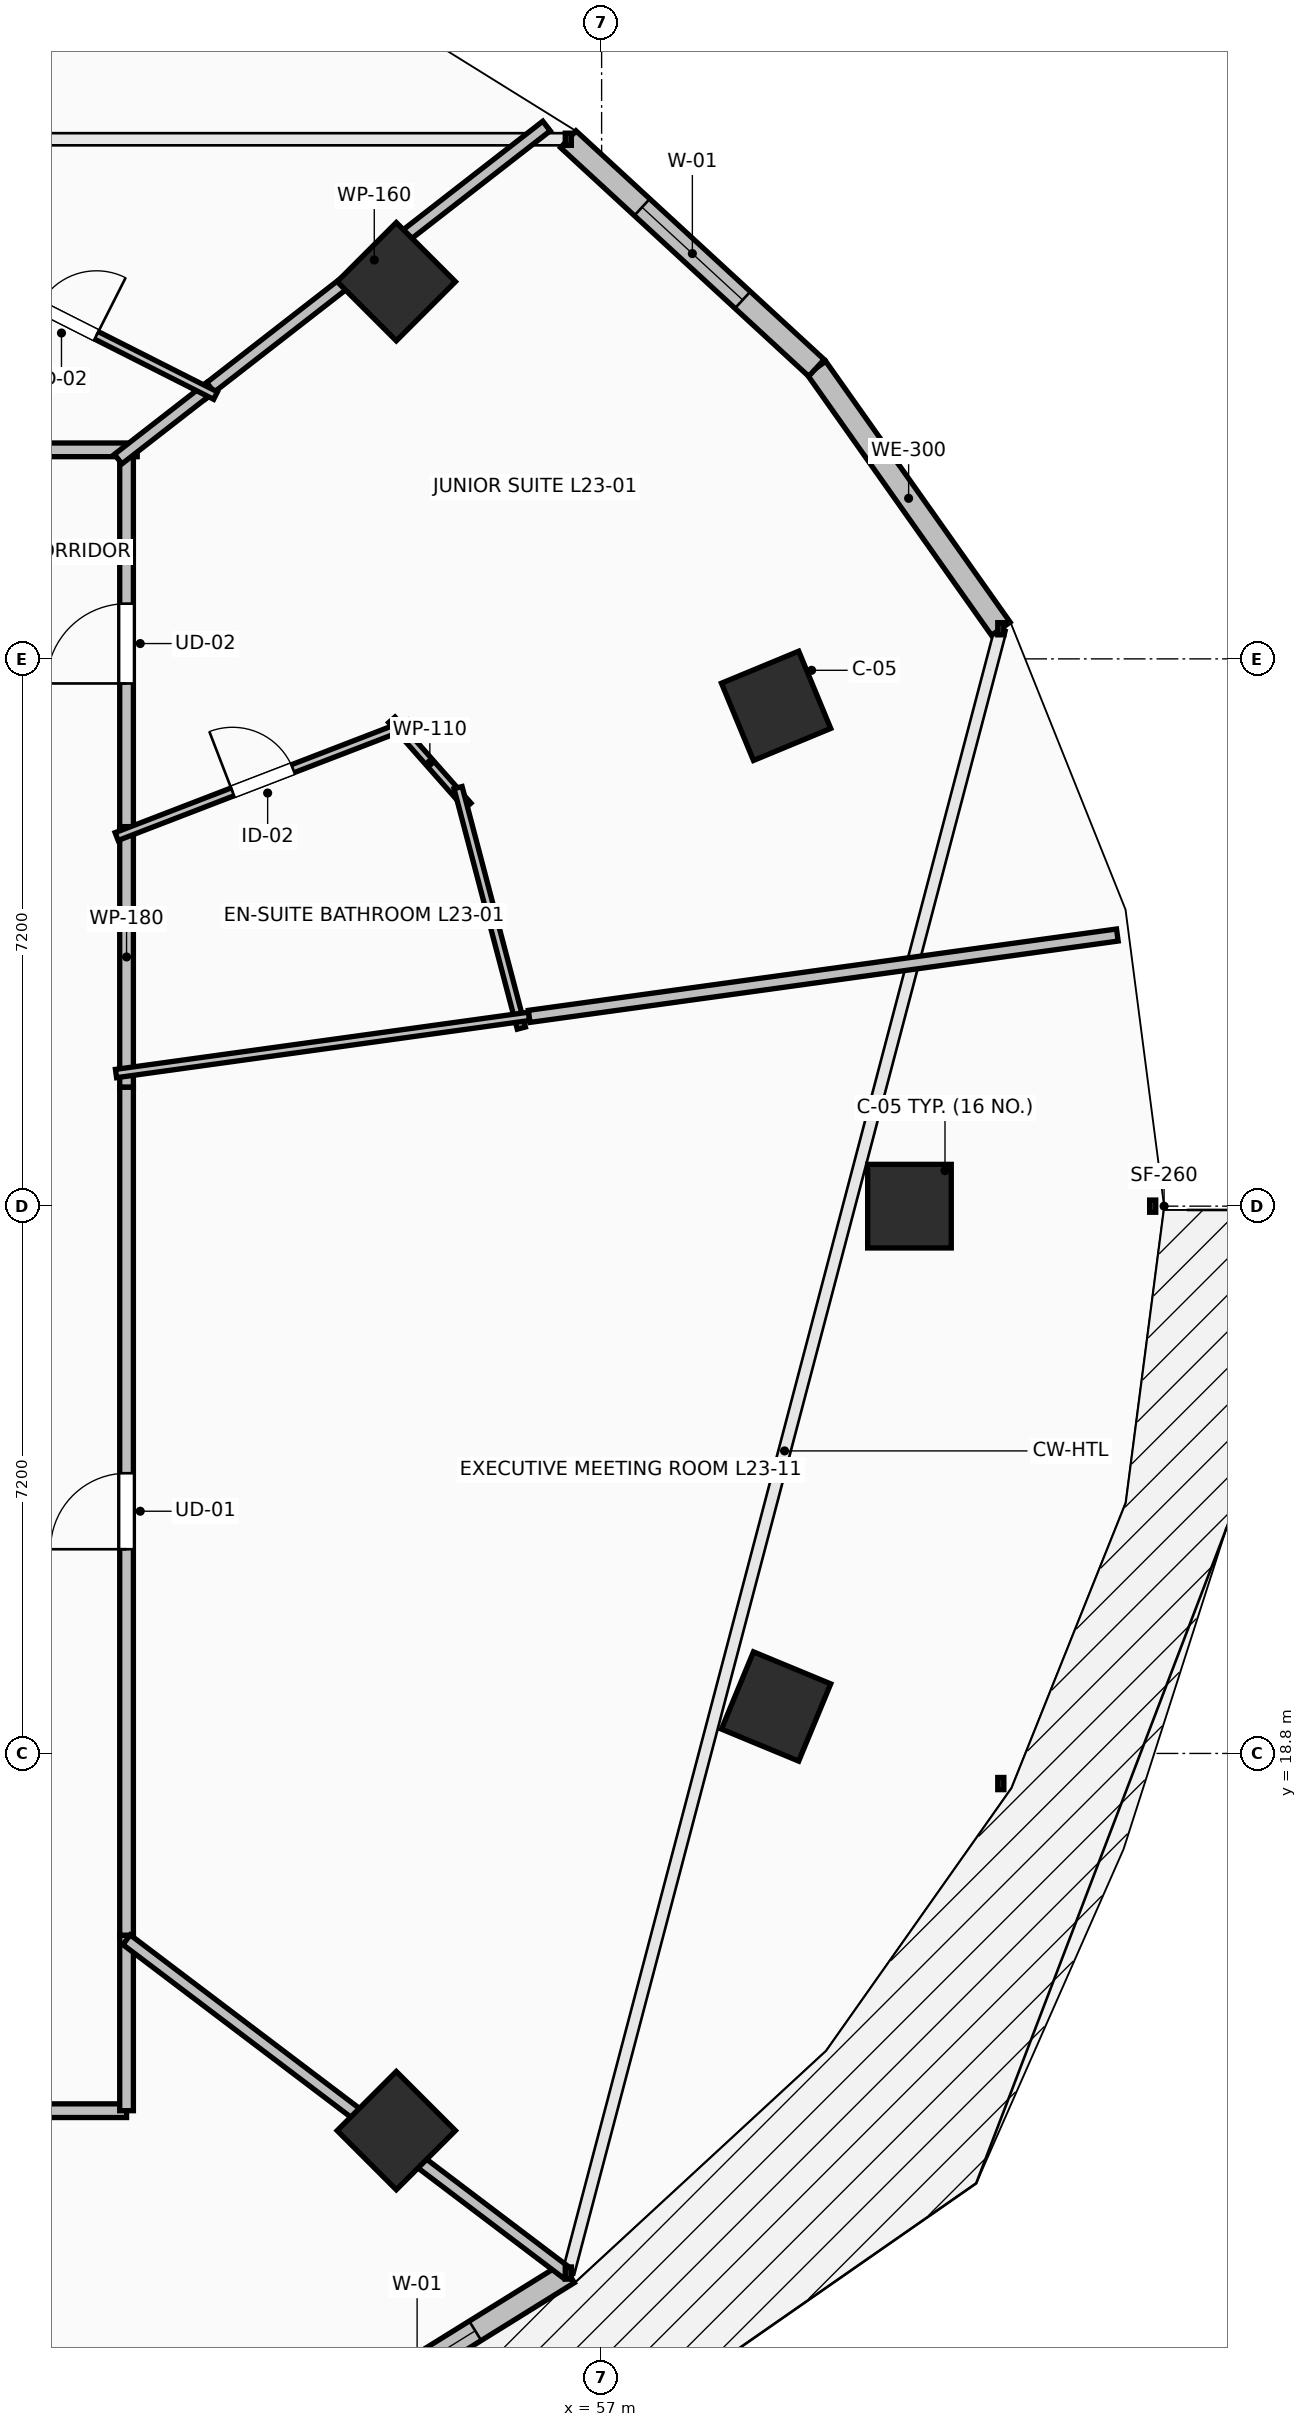
"""IFC4 building model, lengths in metres.
Left out: names, types, materials, properties, quantities, classifications, styles, units other than length and angle.
Written with IfcOpenShell. Run it as: python <this file> out.ifc"""

import sys

from ifc_helpers import new_model, si_unit, direction, frame, frame_2d, origin, origin_2d, place, context, subcontext, project, spatial, rectangle, extrude, element, fill, save


model = new_model("IFC4")
c1 = context("Model", 3, precision=1e-05, world=origin(), true_north=direction((0.0, 1.0)))
c2 = subcontext(c1, "Body", "Model", "MODEL_VIEW")
j1 = project(units=[si_unit("LENGTHUNIT", "METRE"), si_unit("PLANEANGLEUNIT", "RADIAN")], contexts=[c1])
p1 = place(None, origin())
s1 = spatial("IfcSite", under=j1, at=p1, CompositionType="ELEMENT")
p2 = place(p1, origin())
s2 = spatial("IfcBuilding", under=s1, at=p2, CompositionType="ELEMENT")
p3 = place(p2, frame((0.0, 0.0, 89.3)))
s3 = spatial("IfcBuildingStorey", under=s2, at=p3, CompositionType="ELEMENT", Elevation=89.3)
for number, where, z_axis, x_axis in (
    (1, (61.05, 26.0, 0.0), (0.0, 0.0, 1.0), (1.0, 0.0, 0.0)),
    (2, (59.295, 32.582, 0.0), (0.0, 0.0, 1.0), (0.924, 0.383, 0.0)),
    (3, (54.299, 38.162, 0.0), (0.0, 0.0, 1.0), (0.707, 0.707, 0.0)),
    (4, (54.299, 13.838, 0.0), (0.0, 0.0, 1.0), (0.707, -0.707, 0.0)),
    (5, (59.295, 19.418, 0.0), (0.0, 0.0, 1.0), (0.924, -0.383, 0.0)),
):
    element("IfcColumn", number, at=place(p3, frame(where, z_axis=z_axis, x_axis=x_axis)), inside=s3, PredefinedType="COLUMN", context=c2, shape_type="SweptSolid", body=[
        extrude(rectangle(XDim=1.1, YDim=1.1, at=origin_2d()), origin(), (0.0, 0.0, 1.0), 3.5),
    ])
p4 = place(p3, frame((62.252, 33.596, 0.0), z_axis=(0.0, 0.0, 1.0), x_axis=(-0.57716435238, 0.81662801222, 0.0)))
e6 = element("IfcWall", 6, at=p4, inside=s3, PredefinedType="STANDARD", context=c2, shape_type="SweptSolid", body=[
    extrude(rectangle(XDim=4.202, YDim=0.3, at=frame_2d((2.101, 0.0))), origin(), (0.0, 0.0, 1.0), 3.24),
])
p5 = place(p3, frame((59.826, 37.028, 0.0), z_axis=(0.0, 0.0, 1.0), x_axis=(-0.735416718093, 0.677615119924, 0.0)))
e7 = element("IfcWall", 7, at=p5, inside=s3, PredefinedType="STANDARD", context=c2, shape_type="SweptSolid", body=[
    extrude(rectangle(XDim=4.439, YDim=0.3, at=frame_2d((2.22, 0.0))), origin(), (0.0, 0.0, 1.0), 3.24),
])
p6 = place(p5, frame((1.32, 0.0, 0.85)))
e8 = element("IfcOpeningElement", 8, at=p6, cuts=e7, PredefinedType="OPENING", context=c2, shape_type="SweptSolid", body=[
    extrude(rectangle(XDim=1.8, YDim=2.19, at=frame_2d((0.9, 1.095))), frame((0.0, 0.165, 0.0), z_axis=(0.0, -1.0, 0.0), x_axis=(1.0, 0.0, 0.0)), (0.0, 0.0, 1.0), 0.33),
])
p7 = place(p3, frame((52.584, 9.495, 0.0), z_axis=(0.0, 0.0, 1.0), x_axis=(0.849684479743, 0.527291461038, 0.0)))
e9 = element("IfcWall", 9, at=p7, inside=s3, PredefinedType="STANDARD", context=c2, shape_type="SweptSolid", body=[
    extrude(rectangle(XDim=4.681, YDim=0.3, at=frame_2d((2.341, 0.0))), origin(), (0.0, 0.0, 1.0), 3.24),
])
p8 = place(p7, frame((1.441, 0.0, 0.85)))
e10 = element("IfcOpeningElement", 10, at=p8, cuts=e9, PredefinedType="OPENING", context=c2, shape_type="SweptSolid", body=[
    extrude(rectangle(XDim=1.8, YDim=2.19, at=frame_2d((0.9, 1.095))), frame((0.0, 0.165, 0.0), z_axis=(0.0, -1.0, 0.0), x_axis=(1.0, 0.0, 0.0)), (0.0, 0.0, 1.0), 0.33),
])
p9 = place(p3, frame((50.75, 30.853, 0.0), z_axis=(0.0, 0.0, 1.0), x_axis=(0.0, 1.0, 0.0)))
e11 = element("IfcWall", 11, at=p9, inside=s3, PredefinedType="PARTITIONING", context=c2, shape_type="SweptSolid", body=[
    extrude(rectangle(XDim=5.097, YDim=0.18, at=frame_2d((2.548, 0.0))), origin(), (0.0, 0.0, 1.0), 2.432),
])
p10 = place(p9, frame((2.023, 0.0, 0.0)))
e12 = element("IfcOpeningElement", 12, at=p10, cuts=e11, PredefinedType="OPENING", context=c2, shape_type="SweptSolid", body=[
    extrude(rectangle(XDim=1.05, YDim=2.2, at=frame_2d((0.525, 1.1))), frame((0.0, 0.105, 0.0), z_axis=(0.0, -1.0, 0.0), x_axis=(1.0, 0.0, 0.0)), (0.0, 0.0, 1.0), 0.21),
])
p11 = place(p3, frame((50.75, 27.564, 0.0), z_axis=(0.0, 0.0, 1.0), x_axis=(0.0, 1.0, 0.0)))
e13 = element("IfcWall", 13, at=p11, inside=s3, PredefinedType="PARTITIONING", context=c2, shape_type="SweptSolid", body=[
    extrude(rectangle(XDim=3.429, YDim=0.18, at=frame_2d((1.714, 0.0))), origin(), (0.0, 0.0, 1.0), 2.432),
])
p12 = place(p3, frame((50.89, 35.95, 0.0), z_axis=(0.0, 0.0, 1.0), x_axis=(-1.0, 0.0, 0.0)))
e14 = element("IfcWall", 14, at=p12, inside=s3, PredefinedType="PARTITIONING", context=c2, shape_type="SweptSolid", body=[
    extrude(rectangle(XDim=4.914, YDim=0.18, at=frame_2d((2.457, 0.0))), origin(), (0.0, 0.0, 1.0), 2.432),
])
p13 = place(p3, frame((44.181, 14.1, 0.0), z_axis=(0.0, 0.0, 1.0), x_axis=(1.0, 0.0, 0.0)))
e15 = element("IfcWall", 15, at=p13, inside=s3, PredefinedType="PARTITIONING", context=c2, shape_type="SweptSolid", body=[
    extrude(rectangle(XDim=6.569, YDim=0.18, at=frame_2d((3.285, 0.0))), origin(), (0.0, 0.0, 1.0), 2.432),
])
p14 = place(p13, frame((2.76, 0.0, 0.0)))
e16 = element("IfcOpeningElement", 16, at=p14, cuts=e15, PredefinedType="OPENING", context=c2, shape_type="SweptSolid", body=[
    extrude(rectangle(XDim=1.05, YDim=2.2, at=frame_2d((0.525, 1.1))), frame((0.0, 0.105, 0.0), z_axis=(0.0, -1.0, 0.0), x_axis=(1.0, 0.0, 0.0)), (0.0, 0.0, 1.0), 0.21),
])
p15 = place(p3, frame((50.75, 14.1, 0.0), z_axis=(0.0, 0.0, 1.0), x_axis=(0.0, 1.0, 0.0)))
e17 = element("IfcWall", 17, at=p15, inside=s3, PredefinedType="PARTITIONING", context=c2, shape_type="SweptSolid", body=[
    extrude(rectangle(XDim=2.309, YDim=0.18, at=frame_2d((1.154, 0.0))), origin(), (0.0, 0.0, 1.0), 2.432),
])
p16 = place(p3, frame((50.75, 16.409, 0.0), z_axis=(0.0, 0.0, 1.0), x_axis=(0.0, 1.0, 0.0)))
e18 = element("IfcWall", 18, at=p16, inside=s3, PredefinedType="PARTITIONING", context=c2, shape_type="SweptSolid", body=[
    extrude(rectangle(XDim=11.155, YDim=0.18, at=frame_2d((5.578, 0.0))), origin(), (0.0, 0.0, 1.0), 2.432),
])
p17 = place(p16, frame((5.077, 0.0, 0.0)))
e19 = element("IfcOpeningElement", 19, at=p17, cuts=e18, PredefinedType="OPENING", context=c2, shape_type="SweptSolid", body=[
    extrude(rectangle(XDim=1.0, YDim=2.15, at=frame_2d((0.5, 1.075))), frame((0.0, 0.105, 0.0), z_axis=(0.0, -1.0, 0.0), x_axis=(1.0, 0.0, 0.0)), (0.0, 0.0, 1.0), 0.21),
])
p18 = place(p3, frame((54.24, 32.398, 0.0), z_axis=(0.0, 0.0, 1.0), x_axis=(0.661931735756, -0.749564124808, 0.0)))
e20 = element("IfcWall", 20, at=p18, inside=s3, PredefinedType="PARTITIONING", context=c2, shape_type="SweptSolid", body=[
    extrude(rectangle(XDim=1.51, YDim=0.11, at=frame_2d((0.755, 0.0))), origin(), (0.0, 0.0, 1.0), 3.24),
])
p19 = place(p3, frame((55.111, 31.506, 0.0), z_axis=(0.0, 0.0, 1.0), x_axis=(0.254405137241, -0.967097733502, 0.0)))
e21 = element("IfcWall", 21, at=p19, inside=s3, PredefinedType="PARTITIONING", context=c2, shape_type="SweptSolid", body=[
    extrude(rectangle(XDim=3.271, YDim=0.11, at=frame_2d((1.636, 0.0))), origin(), (0.0, 0.0, 1.0), 2.922),
])
p20 = place(p3, frame((56.047, 28.497, 0.0), z_axis=(0.0, 0.0, 1.0), x_axis=(-0.990553307294, -0.137128207927, 0.0)))
e22 = element("IfcWall", 22, at=p20, inside=s3, PredefinedType="PARTITIONING", context=c2, shape_type="SweptSolid", body=[
    extrude(rectangle(XDim=5.487, YDim=0.11, at=frame_2d((2.744, 0.0))), origin(), (0.0, 0.0, 1.0), 2.432),
])
p21 = place(p3, frame((50.619, 30.863, 0.0), z_axis=(0.0, 0.0, 1.0), x_axis=(0.933189718051, 0.359384126144, 0.0)))
e23 = element("IfcWall", 23, at=p21, inside=s3, PredefinedType="PARTITIONING", context=c2, shape_type="SweptSolid", body=[
    extrude(rectangle(XDim=4.119, YDim=0.11, at=frame_2d((2.06, 0.0))), origin(), (0.0, 0.0, 1.0), 2.972),
])
p22 = place(p21, frame((1.635, 0.0, 0.0)))
e24 = element("IfcOpeningElement", 24, at=p22, cuts=e23, PredefinedType="OPENING", context=c2, shape_type="SweptSolid", body=[
    extrude(rectangle(XDim=0.85, YDim=2.1, at=frame_2d((0.425, 1.05))), frame((0.0, 0.07, 0.0), z_axis=(0.0, -1.0, 0.0), x_axis=(1.0, 0.0, 0.0)), (0.0, 0.0, 1.0), 0.14),
])
p23 = place(p3, frame((56.275, 40.21, 0.0), z_axis=(0.0, 0.0, 1.0), x_axis=(-0.78943235806, -0.613837561614, 0.0)))
e25 = element("IfcWall", 25, at=p23, inside=s3, PredefinedType="PARTITIONING", context=c2, shape_type="SweptSolid", body=[
    extrude(rectangle(XDim=5.741, YDim=0.16, at=frame_2d((2.87, 0.0))), origin(), (0.0, 0.0, 1.0), 2.677),
])
p24 = place(p3, frame((51.854, 36.772, 0.0), z_axis=(0.0, 0.0, 1.0), x_axis=(-0.789420593357, -0.613852691436, 0.0)))
e26 = element("IfcWall", 26, at=p24, inside=s3, PredefinedType="PARTITIONING", context=c2, shape_type="SweptSolid", body=[
    extrude(rectangle(XDim=1.538, YDim=0.16, at=frame_2d((0.769, 0.0))), origin(), (0.0, 0.0, 1.0), 2.922),
])
p25 = place(p3, frame((56.047, 28.497, 0.0), z_axis=(0.0, 0.0, 1.0), x_axis=(0.990569127114, 0.137013883997, 0.0)))
e27 = element("IfcWall", 27, at=p25, inside=s3, PredefinedType="PARTITIONING", context=c2, shape_type="SweptSolid", body=[
    extrude(rectangle(XDim=7.812, YDim=0.16, at=frame_2d((3.906, 0.0))), origin(), (0.0, 0.0, 1.0), 2.677),
])
p26 = place(p3, frame((48.029, 38.631, 0.0), z_axis=(0.0, 0.0, 1.0), x_axis=(0.892459125519, -0.451128262558, 0.0)))
e28 = element("IfcWall", 28, at=p26, inside=s3, PredefinedType="PARTITIONING", context=c2, shape_type="SweptSolid", body=[
    extrude(rectangle(XDim=4.361, YDim=0.11, at=frame_2d((2.18, 0.0))), origin(), (0.0, 0.0, 1.0), 3.24),
])
p27 = place(p26, frame((1.755, 0.0, 0.0)))
e29 = element("IfcOpeningElement", 29, at=p27, cuts=e28, PredefinedType="OPENING", context=c2, shape_type="SweptSolid", body=[
    extrude(rectangle(XDim=0.85, YDim=2.1, at=frame_2d((0.425, 1.05))), frame((0.0, 0.07, 0.0), z_axis=(0.0, -1.0, 0.0), x_axis=(1.0, 0.0, 0.0)), (0.0, 0.0, 1.0), 0.14),
])
p28 = place(p3, frame((56.548, 11.96, 0.0), z_axis=(0.0, 0.0, 1.0), x_axis=(-0.797312940684, 0.603566131105, 0.0)))
e30 = element("IfcWall", 30, at=p28, inside=s3, PredefinedType="PARTITIONING", context=c2, shape_type="SweptSolid", body=[
    extrude(rectangle(XDim=7.272, YDim=0.16, at=frame_2d((3.636, 0.0))), origin(), (0.0, 0.0, 1.0), 2.432),
])
p29 = place(p6, origin())
e31 = element("IfcWindow", 31, at=p29, inside=s3, PartitioningType="SINGLE_PANEL", PredefinedType="WINDOW", context=c2, shape_type="SweptSolid", body=[
    extrude(rectangle(XDim=1.8, YDim=2.19, at=frame_2d((0.9, 1.095))), frame((0.0, 0.03, 0.0), z_axis=(0.0, -1.0, 0.0), x_axis=(1.0, 0.0, 0.0)), (0.0, 0.0, 1.0), 0.06),
])
fill(e8, e31)
p30 = place(p8, origin())
e32 = element("IfcWindow", 32, at=p30, inside=s3, PartitioningType="SINGLE_PANEL", PredefinedType="WINDOW", context=c2, shape_type="SweptSolid", body=[
    extrude(rectangle(XDim=1.8, YDim=2.19, at=frame_2d((0.9, 1.095))), frame((0.0, 0.03, 0.0), z_axis=(0.0, -1.0, 0.0), x_axis=(1.0, 0.0, 0.0)), (0.0, 0.0, 1.0), 0.06),
])
fill(e10, e32)
p31 = place(p10, origin())
e33 = element("IfcDoor", 33, at=p31, inside=s3, OperationType="SINGLE_SWING_LEFT", PredefinedType="DOOR", context=c2, shape_type="SweptSolid", body=[
    extrude(rectangle(XDim=1.05, YDim=2.2, at=frame_2d((0.525, 1.1))), frame((0.0, 0.025, 0.0), z_axis=(0.0, -1.0, 0.0), x_axis=(1.0, 0.0, 0.0)), (0.0, 0.0, 1.0), 0.05),
])
fill(e12, e33)
p32 = place(p17, origin())
e34 = element("IfcDoor", 34, at=p32, inside=s3, OperationType="SINGLE_SWING_LEFT", PredefinedType="DOOR", context=c2, shape_type="SweptSolid", body=[
    extrude(rectangle(XDim=1.0, YDim=2.15, at=frame_2d((0.5, 1.075))), frame((0.0, 0.025, 0.0), z_axis=(0.0, -1.0, 0.0), x_axis=(1.0, 0.0, 0.0)), (0.0, 0.0, 1.0), 0.05),
])
fill(e19, e34)
p33 = place(p22, origin())
e35 = element("IfcDoor", 35, at=p33, inside=s3, OperationType="SINGLE_SWING_LEFT", PredefinedType="DOOR", context=c2, shape_type="SweptSolid", body=[
    extrude(rectangle(XDim=0.85, YDim=2.1, at=frame_2d((0.425, 1.05))), frame((0.0, 0.025, 0.0), z_axis=(0.0, -1.0, 0.0), x_axis=(1.0, 0.0, 0.0)), (0.0, 0.0, 1.0), 0.05),
])
fill(e24, e35)
p34 = place(p27, origin())
e36 = element("IfcDoor", 36, at=p34, inside=s3, OperationType="SINGLE_SWING_RIGHT", PredefinedType="DOOR", context=c2, shape_type="SweptSolid", body=[
    extrude(rectangle(XDim=0.85, YDim=2.1, at=frame_2d((0.425, 1.05))), frame((0.0, 0.025, 0.0), z_axis=(0.0, -1.0, 0.0), x_axis=(1.0, 0.0, 0.0)), (0.0, 0.0, 1.0), 0.05),
])
fill(e29, e36)
save(model, sys.argv[1])
